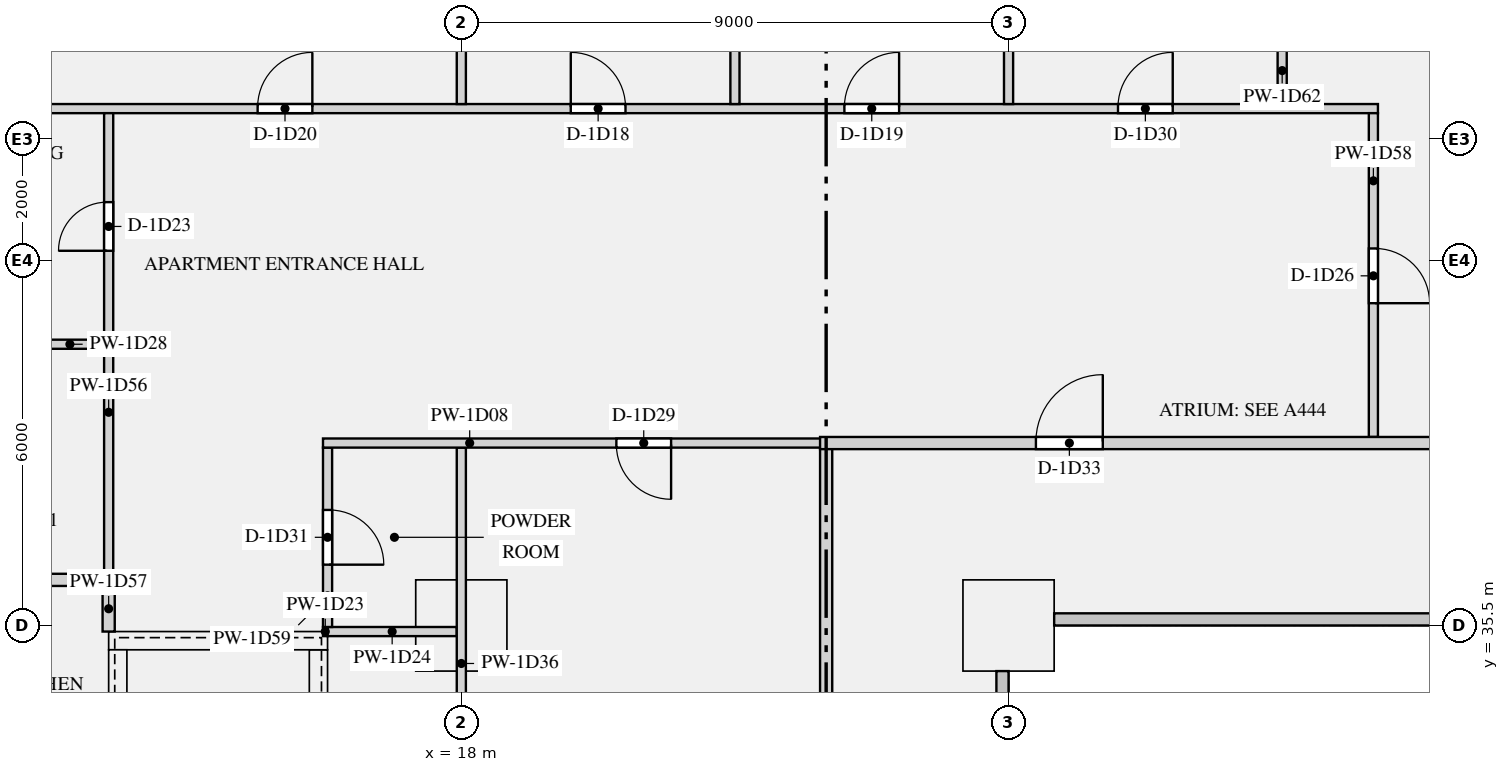
"""IFC4 building model, lengths in metres.
Left out: names, types, materials, properties, quantities, classifications, styles, units other than length and angle.
Written with IfcOpenShell. Run it as: python <this file> out.ifc"""

import sys

from ifc_helpers import new_model, si_unit, direction, frame, frame_2d, origin, origin_2d, place, context, subcontext, project, spatial, rectangle, extrude, element, fill, save


model = new_model("IFC4")
c1 = context("Model", 3, precision=1e-05, world=origin(), true_north=direction((0.0, 1.0)))
c2 = subcontext(c1, "Body", "Model", "MODEL_VIEW")
j1 = project(units=[si_unit("LENGTHUNIT", "METRE"), si_unit("PLANEANGLEUNIT", "RADIAN")], contexts=[c1])
p1 = place(None, origin())
s1 = spatial("IfcSite", under=j1, at=p1, CompositionType="ELEMENT")
p2 = place(p1, origin())
s2 = spatial("IfcBuilding", under=s1, at=p2, CompositionType="ELEMENT")
p3 = place(p2, frame((0.0, 0.0, 47.85)))
s3 = spatial("IfcBuildingStorey", under=s2, at=p3, CompositionType="ELEMENT", Elevation=47.85)
for number, where, z_axis, x_axis in (
    (1, (18.0, 35.5, 0.0), (0.0, 0.0, 1.0), (1.0, 0.0, 0.0)),
    (2, (27.0, 35.5, 0.0), (0.0, 0.0, 1.0), (1.0, 0.0, 0.0)),
):
    element("IfcColumn", number, at=place(p3, frame(where, z_axis=z_axis, x_axis=x_axis)), inside=s3, PredefinedType="COLUMN", context=c2, shape_type="SweptSolid", body=[
        extrude(rectangle(XDim=1.5, YDim=1.5, at=origin_2d()), origin(), (0.0, 0.0, 1.0), 3.15),
    ])
p4 = place(p3, frame((12.2, 35.25, 0.0), z_axis=(0.0, 0.0, 1.0), x_axis=(1.0, 0.0, 0.0)))
e3 = element("IfcWall", 3, at=p4, inside=s3, PredefinedType="SHEAR", context=c2, shape_type="SweptSolid", body=[
    extrude(rectangle(XDim=3.6, YDim=0.3, at=frame_2d((1.8, 0.0))), origin(), (0.0, 0.0, 1.0), 3.15),
])
for number, where, z_axis, x_axis in (
    (4, (12.35, 27.3, 0.0), (0.0, 0.0, 1.0), (0.0, 1.0, 0.0)),
    (5, (15.65, 27.3, 0.0), (0.0, 0.0, 1.0), (0.0, 1.0, 0.0)),
):
    element("IfcWall", number, at=place(p3, frame(where, z_axis=z_axis, x_axis=x_axis)), inside=s3, PredefinedType="SHEAR", context=c2, shape_type="SweptSolid", body=[
        extrude(rectangle(XDim=7.8, YDim=0.3, at=frame_2d((3.9, 0.0))), origin(), (0.0, 0.0, 1.0), 3.15),
    ])
p5 = place(p3, frame((15.725, 38.5, 0.0), z_axis=(0.0, 0.0, 1.0), x_axis=(1.0, 0.0, 0.0)))
e6 = element("IfcWall", 6, at=p5, inside=s3, PredefinedType="PARTITIONING", context=c2, shape_type="SweptSolid", body=[
    extrude(rectangle(XDim=8.375, YDim=0.15, at=frame_2d((4.188, 0.0))), origin(), (0.0, 0.0, 1.0), 2.83),
])
p6 = place(p5, frame((4.825, 0.0, 0.0)))
e7 = element("IfcOpeningElement", 7, at=p6, cuts=e6, PredefinedType="OPENING", context=c2, shape_type="SweptSolid", body=[
    extrude(rectangle(XDim=0.9, YDim=2.1, at=frame_2d((0.45, 1.05))), frame((0.0, 0.085, 0.0), z_axis=(0.0, -1.0, 0.0), x_axis=(1.0, 0.0, 0.0)), (0.0, 0.0, 1.0), 0.17),
])
p7 = place(p3, frame((23.9, 38.5, 0.0), z_axis=(0.0, 0.0, 1.0), x_axis=(1.0, 0.0, 0.0)))
e8 = element("IfcWall", 8, at=p7, inside=s3, PredefinedType="PARTITIONING", context=c2, shape_type="SweptSolid", body=[
    extrude(rectangle(XDim=24.2, YDim=0.2, at=frame_2d((12.1, 0.0))), origin(), (0.0, 0.0, 1.0), 2.83),
])
p8 = place(p7, frame((3.55, 0.0, 0.0)))
e9 = element("IfcOpeningElement", 9, at=p8, cuts=e8, PredefinedType="OPENING", context=c2, shape_type="SweptSolid", body=[
    extrude(rectangle(XDim=1.1, YDim=2.1, at=frame_2d((0.55, 1.05))), frame((0.0, 0.11, 0.0), z_axis=(0.0, -1.0, 0.0), x_axis=(1.0, 0.0, 0.0)), (0.0, 0.0, 1.0), 0.22),
])
p9 = place(p7, frame((21.4, 0.0, 0.0)))
e10 = element("IfcOpeningElement", 10, at=p9, cuts=e8, PredefinedType="OPENING", context=c2, shape_type="SweptSolid", body=[
    extrude(rectangle(XDim=1.1, YDim=2.1, at=frame_2d((0.55, 1.05))), frame((0.0, 0.11, 0.0), z_axis=(0.0, -1.0, 0.0), x_axis=(1.0, 0.0, 0.0)), (0.0, 0.0, 1.0), 0.22),
])
p10 = place(p3, frame((0.8, 36.25, 0.0), z_axis=(0.0, 0.0, 1.0), x_axis=(1.0, 0.0, 0.0)))
e11 = element("IfcWall", 11, at=p10, inside=s3, PredefinedType="PARTITIONING", context=c2, shape_type="SweptSolid", body=[
    extrude(rectangle(XDim=11.475, YDim=0.2, at=frame_2d((5.737, 0.0))), origin(), (0.0, 0.0, 1.0), 2.83),
])
p11 = place(p3, frame((5.3, 44.0, 0.0), z_axis=(0.0, 0.0, 1.0), x_axis=(1.0, 0.0, 0.0)))
e12 = element("IfcWall", 12, at=p11, inside=s3, PredefinedType="PARTITIONING", context=c2, shape_type="SweptSolid", body=[
    extrude(rectangle(XDim=27.775, YDim=0.15, at=frame_2d((13.887, 0.0))), origin(), (0.0, 0.0, 1.0), 2.83),
])
p12 = place(p11, frame((14.5, 0.0, 0.0)))
e13 = element("IfcOpeningElement", 13, at=p12, cuts=e12, PredefinedType="OPENING", context=c2, shape_type="SweptSolid", body=[
    extrude(rectangle(XDim=0.9, YDim=2.1, at=frame_2d((0.45, 1.05))), frame((0.0, 0.085, 0.0), z_axis=(0.0, -1.0, 0.0), x_axis=(1.0, 0.0, 0.0)), (0.0, 0.0, 1.0), 0.17),
])
p13 = place(p11, frame((19.0, 0.0, 0.0)))
e14 = element("IfcOpeningElement", 14, at=p13, cuts=e12, PredefinedType="OPENING", context=c2, shape_type="SweptSolid", body=[
    extrude(rectangle(XDim=0.9, YDim=2.1, at=frame_2d((0.45, 1.05))), frame((0.0, 0.085, 0.0), z_axis=(0.0, -1.0, 0.0), x_axis=(1.0, 0.0, 0.0)), (0.0, 0.0, 1.0), 0.17),
])
p14 = place(p11, frame((9.35, 0.0, 0.0)))
e15 = element("IfcOpeningElement", 15, at=p14, cuts=e12, PredefinedType="OPENING", context=c2, shape_type="SweptSolid", body=[
    extrude(rectangle(XDim=0.9, YDim=2.1, at=frame_2d((0.45, 1.05))), frame((0.0, 0.085, 0.0), z_axis=(0.0, -1.0, 0.0), x_axis=(1.0, 0.0, 0.0)), (0.0, 0.0, 1.0), 0.17),
])
p15 = place(p11, frame((23.5, 0.0, 0.0)))
e16 = element("IfcOpeningElement", 16, at=p15, cuts=e12, PredefinedType="OPENING", context=c2, shape_type="SweptSolid", body=[
    extrude(rectangle(XDim=0.9, YDim=2.1, at=frame_2d((0.45, 1.05))), frame((0.0, 0.085, 0.0), z_axis=(0.0, -1.0, 0.0), x_axis=(1.0, 0.0, 0.0)), (0.0, 0.0, 1.0), 0.17),
])
p16 = place(p3, frame((15.725, 35.4, 0.0), z_axis=(0.0, 0.0, 1.0), x_axis=(1.0, 0.0, 0.0)))
e17 = element("IfcWall", 17, at=p16, inside=s3, PredefinedType="PARTITIONING", context=c2, shape_type="SweptSolid", body=[
    extrude(rectangle(XDim=0.075, YDim=0.15, at=frame_2d((0.038, 0.0))), origin(), (0.0, 0.0, 1.0), 2.83),
])
p17 = place(p3, frame((15.8, 35.4, 0.0), z_axis=(0.0, 0.0, 1.0), x_axis=(1.0, 0.0, 0.0)))
e18 = element("IfcWall", 18, at=p17, inside=s3, PredefinedType="PARTITIONING", context=c2, shape_type="SweptSolid", body=[
    extrude(rectangle(XDim=2.125, YDim=0.15, at=frame_2d((1.062, 0.0))), origin(), (0.0, 0.0, 1.0), 2.83),
])
p18 = place(p3, frame((9.075, 40.125, 0.0), z_axis=(0.0, 0.0, 1.0), x_axis=(1.0, 0.0, 0.0)))
e19 = element("IfcWall", 19, at=p18, inside=s3, PredefinedType="PARTITIONING", context=c2, shape_type="SweptSolid", body=[
    extrude(rectangle(XDim=3.05, YDim=0.15, at=frame_2d((1.525, 0.0))), origin(), (0.0, 0.0, 1.0), 2.83),
])
p19 = place(p18, frame((1.125, 0.0, 0.0)))
e20 = element("IfcOpeningElement", 20, at=p19, cuts=e19, PredefinedType="OPENING", context=c2, shape_type="SweptSolid", body=[
    extrude(rectangle(XDim=0.8, YDim=2.1, at=frame_2d((0.4, 1.05))), frame((0.0, 0.085, 0.0), z_axis=(0.0, -1.0, 0.0), x_axis=(1.0, 0.0, 0.0)), (0.0, 0.0, 1.0), 0.17),
])
p20 = place(p3, frame((18.0, 27.1, 0.0), z_axis=(0.0, 0.0, 1.0), x_axis=(0.0, 1.0, 0.0)))
e21 = element("IfcWall", 21, at=p20, inside=s3, PredefinedType="PARTITIONING", context=c2, shape_type="SweptSolid", body=[
    extrude(rectangle(XDim=11.325, YDim=0.15, at=frame_2d((5.663, 0.0))), origin(), (0.0, 0.0, 1.0), 2.83),
])
p21 = place(p20, frame((3.325, 0.0, 0.0)))
e22 = element("IfcOpeningElement", 22, at=p21, cuts=e21, PredefinedType="OPENING", context=c2, shape_type="SweptSolid", body=[
    extrude(rectangle(XDim=0.9, YDim=2.1, at=frame_2d((0.45, 1.05))), frame((0.0, 0.085, 0.0), z_axis=(0.0, -1.0, 0.0), x_axis=(1.0, 0.0, 0.0)), (0.0, 0.0, 1.0), 0.17),
])
p22 = place(p3, frame((18.0, 44.075, 0.0), z_axis=(0.0, 0.0, 1.0), x_axis=(0.0, 1.0, 0.0)))
e23 = element("IfcWall", 23, at=p22, inside=s3, PredefinedType="PARTITIONING", context=c2, shape_type="SweptSolid", body=[
    extrude(rectangle(XDim=3.625, YDim=0.15, at=frame_2d((1.812, 0.0))), origin(), (0.0, 0.0, 1.0), 2.83),
])
p23 = place(p3, frame((24.0, 27.1, 0.0), z_axis=(0.0, 0.0, 1.0), x_axis=(0.0, 1.0, 0.0)))
e24 = element("IfcWall", 24, at=p23, inside=s3, PredefinedType="PARTITIONING", context=c2, shape_type="SweptSolid", body=[
    extrude(rectangle(XDim=11.325, YDim=0.2, at=frame_2d((5.663, 0.0))), origin(), (0.0, 0.0, 1.0), 2.83),
])
p24 = place(p3, frame((12.2, 36.35, 0.0), z_axis=(0.0, 0.0, 1.0), x_axis=(0.0, 1.0, 0.0)))
e25 = element("IfcWall", 25, at=p24, inside=s3, PredefinedType="PARTITIONING", context=c2, shape_type="SweptSolid", body=[
    extrude(rectangle(XDim=7.575, YDim=0.15, at=frame_2d((3.788, 0.0))), origin(), (0.0, 0.0, 1.0), 2.83),
])
p25 = place(p24, frame((5.312, 0.0, 0.0)))
e26 = element("IfcOpeningElement", 26, at=p25, cuts=e25, PredefinedType="OPENING", context=c2, shape_type="SweptSolid", body=[
    extrude(rectangle(XDim=0.8, YDim=2.1, at=frame_2d((0.4, 1.05))), frame((0.0, 0.085, 0.0), z_axis=(0.0, -1.0, 0.0), x_axis=(1.0, 0.0, 0.0)), (0.0, 0.0, 1.0), 0.17),
])
p26 = place(p3, frame((12.2, 35.4, 0.0), z_axis=(0.0, 0.0, 1.0), x_axis=(0.0, 1.0, 0.0)))
e27 = element("IfcWall", 27, at=p26, inside=s3, PredefinedType="PARTITIONING", context=c2, shape_type="SweptSolid", body=[
    extrude(rectangle(XDim=0.75, YDim=0.2, at=frame_2d((0.375, 0.0))), origin(), (0.0, 0.0, 1.0), 2.83),
])
p27 = place(p3, frame((33.0, 38.6, 0.0), z_axis=(0.0, 0.0, 1.0), x_axis=(0.0, 1.0, 0.0)))
e28 = element("IfcWall", 28, at=p27, inside=s3, PredefinedType="PARTITIONING", context=c2, shape_type="SweptSolid", body=[
    extrude(rectangle(XDim=5.325, YDim=0.15, at=frame_2d((2.663, 0.0))), origin(), (0.0, 0.0, 1.0), 2.83),
])
p28 = place(p27, frame((2.2, 0.0, 0.0)))
e29 = element("IfcOpeningElement", 29, at=p28, cuts=e28, PredefinedType="OPENING", context=c2, shape_type="SweptSolid", body=[
    extrude(rectangle(XDim=0.9, YDim=2.1, at=frame_2d((0.45, 1.05))), frame((0.0, 0.085, 0.0), z_axis=(0.0, -1.0, 0.0), x_axis=(1.0, 0.0, 0.0)), (0.0, 0.0, 1.0), 0.17),
])
p29 = place(p3, frame((15.8, 35.475, 0.0), z_axis=(0.0, 0.0, 1.0), x_axis=(0.0, 1.0, 0.0)))
e30 = element("IfcWall", 30, at=p29, inside=s3, PredefinedType="PARTITIONING", context=c2, shape_type="SweptSolid", body=[
    extrude(rectangle(XDim=2.95, YDim=0.15, at=frame_2d((1.475, 0.0))), origin(), (0.0, 0.0, 1.0), 2.83),
])
p30 = place(p29, frame((1.025, 0.0, 0.0)))
e31 = element("IfcOpeningElement", 31, at=p30, cuts=e30, PredefinedType="OPENING", context=c2, shape_type="SweptSolid", body=[
    extrude(rectangle(XDim=0.9, YDim=2.1, at=frame_2d((0.45, 1.05))), frame((0.0, 0.085, 0.0), z_axis=(0.0, -1.0, 0.0), x_axis=(1.0, 0.0, 0.0)), (0.0, 0.0, 1.0), 0.17),
])
for number, where, z_axis, x_axis in (
    (32, (22.5, 44.075, 0.0), (0.0, 0.0, 1.0), (0.0, 1.0, 0.0)),
    (33, (27.0, 44.075, 0.0), (0.0, 0.0, 1.0), (0.0, 1.0, 0.0)),
):
    element("IfcWall", number, at=place(p3, frame(where, z_axis=z_axis, x_axis=x_axis)), inside=s3, PredefinedType="PARTITIONING", context=c2, shape_type="SweptSolid", body=[
        extrude(rectangle(XDim=3.625, YDim=0.15, at=frame_2d((1.812, 0.0))), origin(), (0.0, 0.0, 1.0), 2.83),
    ])
p31 = place(p3, frame((31.5, 44.075, 0.0), z_axis=(0.0, 0.0, 1.0), x_axis=(0.0, 1.0, 0.0)))
e34 = element("IfcWall", 34, at=p31, inside=s3, PredefinedType="PARTITIONING", context=c2, shape_type="SweptSolid", body=[
    extrude(rectangle(XDim=3.625, YDim=0.15, at=frame_2d((1.812, 0.0))), origin(), (0.0, 0.0, 1.0), 2.83),
])
p32 = place(p31, frame((1.1, 0.0, 0.0)))
e35 = element("IfcOpeningElement", 35, at=p32, cuts=e34, PredefinedType="OPENING", context=c2, shape_type="SweptSolid", body=[
    extrude(rectangle(XDim=1.5, YDim=2.1, at=frame_2d((0.75, 1.05))), frame((0.0, 0.085, 0.0), z_axis=(0.0, -1.0, 0.0), x_axis=(1.0, 0.0, 0.0)), (0.0, 0.0, 1.0), 0.17),
])
p33 = place(p12, origin())
e36 = element("IfcDoor", 36, at=p33, inside=s3, OperationType="SINGLE_SWING_LEFT", PredefinedType="DOOR", context=c2, shape_type="SweptSolid", body=[
    extrude(rectangle(XDim=0.9, YDim=2.1, at=frame_2d((0.45, 1.05))), frame((0.0, 0.025, 0.0), z_axis=(0.0, -1.0, 0.0), x_axis=(1.0, 0.0, 0.0)), (0.0, 0.0, 1.0), 0.05),
])
fill(e13, e36)
p34 = place(p13, origin())
e37 = element("IfcDoor", 37, at=p34, inside=s3, OperationType="SINGLE_SWING_RIGHT", PredefinedType="DOOR", context=c2, shape_type="SweptSolid", body=[
    extrude(rectangle(XDim=0.9, YDim=2.1, at=frame_2d((0.45, 1.05))), frame((0.0, 0.025, 0.0), z_axis=(0.0, -1.0, 0.0), x_axis=(1.0, 0.0, 0.0)), (0.0, 0.0, 1.0), 0.05),
])
fill(e14, e37)
p35 = place(p14, origin())
e38 = element("IfcDoor", 38, at=p35, inside=s3, OperationType="SINGLE_SWING_RIGHT", PredefinedType="DOOR", context=c2, shape_type="SweptSolid", body=[
    extrude(rectangle(XDim=0.9, YDim=2.1, at=frame_2d((0.45, 1.05))), frame((0.0, 0.025, 0.0), z_axis=(0.0, -1.0, 0.0), x_axis=(1.0, 0.0, 0.0)), (0.0, 0.0, 1.0), 0.05),
])
fill(e15, e38)
p36 = place(p25, origin())
e39 = element("IfcDoor", 39, at=p36, inside=s3, OperationType="SINGLE_SWING_LEFT", PredefinedType="DOOR", context=c2, shape_type="SweptSolid", body=[
    extrude(rectangle(XDim=0.8, YDim=2.1, at=frame_2d((0.4, 1.05))), frame((0.0, 0.025, 0.0), z_axis=(0.0, -1.0, 0.0), x_axis=(1.0, 0.0, 0.0)), (0.0, 0.0, 1.0), 0.05),
])
fill(e26, e39)
p37 = place(p28, frame((0.9, 0.0, 0.0), z_axis=(0.0, 0.0, 1.0), x_axis=(-1.0, 0.0, 0.0)))
e40 = element("IfcDoor", 40, at=p37, inside=s3, OperationType="SINGLE_SWING_RIGHT", PredefinedType="DOOR", context=c2, shape_type="SweptSolid", body=[
    extrude(rectangle(XDim=0.9, YDim=2.1, at=frame_2d((0.45, 1.05))), frame((0.0, 0.025, 0.0), z_axis=(0.0, -1.0, 0.0), x_axis=(1.0, 0.0, 0.0)), (0.0, 0.0, 1.0), 0.05),
])
fill(e29, e40)
p38 = place(p6, frame((0.9, 0.0, 0.0), z_axis=(0.0, 0.0, 1.0), x_axis=(-1.0, 0.0, 0.0)))
e41 = element("IfcDoor", 41, at=p38, inside=s3, OperationType="SINGLE_SWING_LEFT", PredefinedType="DOOR", context=c2, shape_type="SweptSolid", body=[
    extrude(rectangle(XDim=0.9, YDim=2.1, at=frame_2d((0.45, 1.05))), frame((0.0, 0.025, 0.0), z_axis=(0.0, -1.0, 0.0), x_axis=(1.0, 0.0, 0.0)), (0.0, 0.0, 1.0), 0.05),
])
fill(e7, e41)
p39 = place(p15, origin())
e42 = element("IfcDoor", 42, at=p39, inside=s3, OperationType="SINGLE_SWING_RIGHT", PredefinedType="DOOR", context=c2, shape_type="SweptSolid", body=[
    extrude(rectangle(XDim=0.9, YDim=2.1, at=frame_2d((0.45, 1.05))), frame((0.0, 0.025, 0.0), z_axis=(0.0, -1.0, 0.0), x_axis=(1.0, 0.0, 0.0)), (0.0, 0.0, 1.0), 0.05),
])
fill(e16, e42)
p40 = place(p30, frame((0.9, 0.0, 0.0), z_axis=(0.0, 0.0, 1.0), x_axis=(-1.0, 0.0, 0.0)))
e43 = element("IfcDoor", 43, at=p40, inside=s3, OperationType="SINGLE_SWING_RIGHT", PredefinedType="DOOR", context=c2, shape_type="SweptSolid", body=[
    extrude(rectangle(XDim=0.9, YDim=2.1, at=frame_2d((0.45, 1.05))), frame((0.0, 0.025, 0.0), z_axis=(0.0, -1.0, 0.0), x_axis=(1.0, 0.0, 0.0)), (0.0, 0.0, 1.0), 0.05),
])
fill(e31, e43)
p41 = place(p8, origin())
e44 = element("IfcDoor", 44, at=p41, inside=s3, OperationType="SINGLE_SWING_RIGHT", PredefinedType="DOOR", context=c2, shape_type="SweptSolid", body=[
    extrude(rectangle(XDim=1.1, YDim=2.1, at=frame_2d((0.55, 1.05))), frame((0.0, 0.025, 0.0), z_axis=(0.0, -1.0, 0.0), x_axis=(1.0, 0.0, 0.0)), (0.0, 0.0, 1.0), 0.05),
])
fill(e9, e44)
save(model, sys.argv[1])
